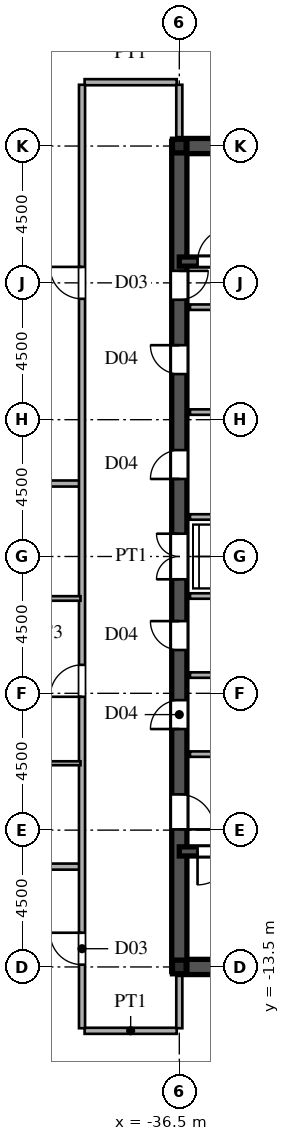
"""IFC4 building model, lengths in metres.
Left out: names, types, materials, properties, quantities, classifications, styles, units other than length and angle.
Written with IfcOpenShell. Run it as: python <this file> out.ifc"""

import sys

from ifc_helpers import new_model, si_unit, direction, frame, frame_2d, origin, origin_2d, place, context, subcontext, project, spatial, rectangle, i_section, extrude, source, transform, mapped, element, fill, save


model = new_model("IFC4")
c1 = context("Model", 3, precision=1e-05, world=origin(), true_north=direction((0.0, 1.0)))
c2 = subcontext(c1, "Body", "Model", "MODEL_VIEW")
j1 = project(units=[si_unit("LENGTHUNIT", "METRE"), si_unit("PLANEANGLEUNIT", "RADIAN")], contexts=[c1])
p1 = place(None, origin())
s1 = spatial("IfcSite", under=j1, at=p1, CompositionType="ELEMENT")
p2 = place(p1, origin())
s2 = spatial("IfcBuilding", under=s1, at=p2, CompositionType="ELEMENT")
p3 = place(p2, frame((0.0, 0.0, 254.4)))
s3 = spatial("IfcBuildingStorey", under=s2, at=p3, CompositionType="ELEMENT", Elevation=254.4)
m1 = source(origin(), c2, "Body", "SweptSolid", [
    extrude(i_section(OverallWidth=0.45, OverallDepth=0.45, WebThickness=0.016, FlangeThickness=0.025, at=origin_2d()), origin(), (0.0, 0.0, 1.0), 3.75),
])
for number, where, z_axis, x_axis in (
    (1, (-36.5, -13.5, 0.0), (0.0, 0.0, 1.0), (1.0, 0.0, 0.0)),
    (2, (-36.5, 13.5, 0.0), (0.0, 0.0, 1.0), (1.0, 0.0, 0.0)),
):
    element("IfcColumn", number, at=place(p3, frame(where, z_axis=z_axis, x_axis=x_axis)), inside=s3, PredefinedType="COLUMN", context=c2, shape_type="MappedRepresentation", body=[
        mapped(m1, transform((0.0, 0.0, 0.0), scale=1.0)),
    ])
for number, where, z_axis, x_axis in (
    (3, (-36.5, -13.5, 0.0), (0.0, 0.0, 1.0), (1.0, 0.0, 0.0)),
    (4, (-36.5, 13.5, 0.0), (0.0, 0.0, 1.0), (1.0, 0.0, 0.0)),
):
    element("IfcWall", number, at=place(p3, frame(where, z_axis=z_axis, x_axis=x_axis)), inside=s3, PredefinedType="SHEAR", context=c2, shape_type="SweptSolid", body=[
        extrude(rectangle(XDim=9.0, YDim=0.5, at=frame_2d((4.5, 0.0))), origin(), (0.0, 0.0, 1.0), 3.53),
    ])
p4 = place(p3, frame((-36.5, -13.65, 0.0), z_axis=(0.0, 0.0, 1.0), x_axis=(0.0, 1.0, 0.0)))
e5 = element("IfcWall", 5, at=p4, inside=s3, PredefinedType="SHEAR", context=c2, shape_type="SweptSolid", body=[
    extrude(rectangle(XDim=7.15, YDim=0.5, at=frame_2d((3.575, 0.0))), origin(), (0.0, 0.0, 1.0), 3.53),
])
p5 = place(p4, frame((4.675, 0.0, 0.0)))
e6 = element("IfcOpeningElement", 6, at=p5, cuts=e5, PredefinedType="OPENING", context=c2, shape_type="SweptSolid", body=[
    extrude(rectangle(XDim=1.15, YDim=2.2, at=frame_2d((0.575, 1.1))), frame((0.0, 0.26, 0.0), z_axis=(0.0, -1.0, 0.0), x_axis=(1.0, 0.0, 0.0)), (0.0, 0.0, 1.0), 0.52),
])
p6 = place(p3, frame((-36.5, -1.3, 0.0), z_axis=(0.0, 0.0, 1.0), x_axis=(0.0, 1.0, 0.0)))
e7 = element("IfcWall", 7, at=p6, inside=s3, PredefinedType="SHEAR", context=c2, shape_type="SweptSolid", body=[
    extrude(rectangle(XDim=2.6, YDim=0.5, at=frame_2d((1.3, 0.0))), origin(), (0.0, 0.0, 1.0), 3.53),
])
p7 = place(p6, frame((0.55, 0.0, 0.0)))
e8 = element("IfcOpeningElement", 8, at=p7, cuts=e7, PredefinedType="OPENING", context=c2, shape_type="SweptSolid", body=[
    extrude(rectangle(XDim=1.5, YDim=2.3, at=frame_2d((0.75, 1.15))), frame((0.0, 0.26, 0.0), z_axis=(0.0, -1.0, 0.0), x_axis=(1.0, 0.0, 0.0)), (0.0, 0.0, 1.0), 0.52),
])
p8 = place(p3, frame((-36.5, 8.2, 0.0), z_axis=(0.0, 0.0, 1.0), x_axis=(0.0, 1.0, 0.0)))
e9 = element("IfcWall", 9, at=p8, inside=s3, PredefinedType="SHEAR", context=c2, shape_type="SweptSolid", body=[
    extrude(rectangle(XDim=5.45, YDim=0.5, at=frame_2d((2.725, 0.0))), origin(), (0.0, 0.0, 1.0), 3.53),
])
p9 = place(p8, frame((0.245, 0.0, 0.0)))
e10 = element("IfcOpeningElement", 10, at=p9, cuts=e9, PredefinedType="OPENING", context=c2, shape_type="SweptSolid", body=[
    extrude(rectangle(XDim=0.95, YDim=2.15, at=frame_2d((0.475, 1.075))), frame((0.0, 0.26, 0.0), z_axis=(0.0, -1.0, 0.0), x_axis=(1.0, 0.0, 0.0)), (0.0, 0.0, 1.0), 0.52),
])
p10 = place(p3, frame((-36.5, -6.5, 0.0), z_axis=(0.0, 0.0, 1.0), x_axis=(0.0, 1.0, 0.0)))
e11 = element("IfcWall", 11, at=p10, inside=s3, PredefinedType="SHEAR", context=c2, shape_type="SweptSolid", body=[
    extrude(rectangle(XDim=2.6, YDim=0.5, at=frame_2d((1.3, 0.0))), origin(), (0.0, 0.0, 1.0), 3.53),
])
p11 = place(p10, frame((0.825, 0.0, 0.0)))
e12 = element("IfcOpeningElement", 12, at=p11, cuts=e11, PredefinedType="OPENING", context=c2, shape_type="SweptSolid", body=[
    extrude(rectangle(XDim=0.95, YDim=2.15, at=frame_2d((0.475, 1.075))), frame((0.0, 0.26, 0.0), z_axis=(0.0, -1.0, 0.0), x_axis=(1.0, 0.0, 0.0)), (0.0, 0.0, 1.0), 0.52),
])
p12 = place(p3, frame((-36.5, -3.9, 0.0), z_axis=(0.0, 0.0, 1.0), x_axis=(0.0, 1.0, 0.0)))
e13 = element("IfcWall", 13, at=p12, inside=s3, PredefinedType="SHEAR", context=c2, shape_type="SweptSolid", body=[
    extrude(rectangle(XDim=2.6, YDim=0.5, at=frame_2d((1.3, 0.0))), origin(), (0.0, 0.0, 1.0), 3.53),
])
p13 = place(p12, frame((0.825, 0.0, 0.0)))
e14 = element("IfcOpeningElement", 14, at=p13, cuts=e13, PredefinedType="OPENING", context=c2, shape_type="SweptSolid", body=[
    extrude(rectangle(XDim=0.95, YDim=2.15, at=frame_2d((0.475, 1.075))), frame((0.0, 0.26, 0.0), z_axis=(0.0, -1.0, 0.0), x_axis=(1.0, 0.0, 0.0)), (0.0, 0.0, 1.0), 0.52),
])
p14 = place(p3, frame((-36.5, 1.3, 0.0), z_axis=(0.0, 0.0, 1.0), x_axis=(0.0, 1.0, 0.0)))
e15 = element("IfcWall", 15, at=p14, inside=s3, PredefinedType="SHEAR", context=c2, shape_type="SweptSolid", body=[
    extrude(rectangle(XDim=3.45, YDim=0.5, at=frame_2d((1.725, 0.0))), origin(), (0.0, 0.0, 1.0), 3.53),
])
p15 = place(p14, frame((1.25, 0.0, 0.0)))
e16 = element("IfcOpeningElement", 16, at=p15, cuts=e15, PredefinedType="OPENING", context=c2, shape_type="SweptSolid", body=[
    extrude(rectangle(XDim=0.95, YDim=2.15, at=frame_2d((0.475, 1.075))), frame((0.0, 0.26, 0.0), z_axis=(0.0, -1.0, 0.0), x_axis=(1.0, 0.0, 0.0)), (0.0, 0.0, 1.0), 0.52),
])
p16 = place(p3, frame((-36.5, 4.75, 0.0), z_axis=(0.0, 0.0, 1.0), x_axis=(0.0, 1.0, 0.0)))
e17 = element("IfcWall", 17, at=p16, inside=s3, PredefinedType="SHEAR", context=c2, shape_type="SweptSolid", body=[
    extrude(rectangle(XDim=3.45, YDim=0.5, at=frame_2d((1.725, 0.0))), origin(), (0.0, 0.0, 1.0), 3.53),
])
p17 = place(p16, frame((1.25, 0.0, 0.0)))
e18 = element("IfcOpeningElement", 18, at=p17, cuts=e17, PredefinedType="OPENING", context=c2, shape_type="SweptSolid", body=[
    extrude(rectangle(XDim=0.95, YDim=2.15, at=frame_2d((0.475, 1.075))), frame((0.0, 0.26, 0.0), z_axis=(0.0, -1.0, 0.0), x_axis=(1.0, 0.0, 0.0)), (0.0, 0.0, 1.0), 0.52),
])
p18 = place(p3, frame((-36.5, -9.7, 0.0), z_axis=(0.0, 0.0, 1.0), x_axis=(1.0, 0.0, 0.0)))
e19 = element("IfcWall", 19, at=p18, inside=s3, PredefinedType="SHEAR", context=c2, shape_type="SweptSolid", body=[
    extrude(rectangle(XDim=9.0, YDim=0.3, at=frame_2d((4.5, 0.0))), origin(), (0.0, 0.0, 1.0), 3.53),
])
p19 = place(p18, frame((0.6, 0.0, 0.0)))
e20 = element("IfcOpeningElement", 20, at=p19, cuts=e19, PredefinedType="OPENING", context=c2, shape_type="SweptSolid", body=[
    extrude(rectangle(XDim=1.1, YDim=2.2, at=frame_2d((0.55, 1.1))), frame((0.0, 0.16, 0.0), z_axis=(0.0, -1.0, 0.0), x_axis=(1.0, 0.0, 0.0)), (0.0, 0.0, 1.0), 0.32),
])
p20 = place(p3, frame((-36.5, 9.7, 0.0), z_axis=(0.0, 0.0, 1.0), x_axis=(1.0, 0.0, 0.0)))
e21 = element("IfcWall", 21, at=p20, inside=s3, PredefinedType="SHEAR", context=c2, shape_type="SweptSolid", body=[
    extrude(rectangle(XDim=9.0, YDim=0.3, at=frame_2d((4.5, 0.0))), origin(), (0.0, 0.0, 1.0), 3.53),
])
p21 = place(p20, frame((0.6, 0.0, 0.0)))
e22 = element("IfcOpeningElement", 22, at=p21, cuts=e21, PredefinedType="OPENING", context=c2, shape_type="SweptSolid", body=[
    extrude(rectangle(XDim=1.1, YDim=2.2, at=frame_2d((0.55, 1.1))), frame((0.0, 0.16, 0.0), z_axis=(0.0, -1.0, 0.0), x_axis=(1.0, 0.0, 0.0)), (0.0, 0.0, 1.0), 0.32),
])
for number, where, z_axis, x_axis in (
    (23, (-36.15, -6.5, 0.0), (0.0, 0.0, 1.0), (1.0, 0.0, 0.0)),
    (24, (-36.15, 8.2, 0.0), (0.0, 0.0, 1.0), (1.0, 0.0, 0.0)),
):
    element("IfcWall", number, at=place(p3, frame(where, z_axis=z_axis, x_axis=x_axis)), inside=s3, PredefinedType="PARTITIONING", context=c2, shape_type="SweptSolid", body=[
        extrude(rectangle(XDim=5.7, YDim=0.18, at=frame_2d((2.85, 0.0))), origin(), (0.0, 0.0, 1.0), 3.53),
    ])
for number, where, z_axis, x_axis in (
    (25, (-36.15, -1.3, 0.0), (0.0, 0.0, 1.0), (1.0, 0.0, 0.0)),
    (26, (-36.15, 1.3, 0.0), (0.0, 0.0, 1.0), (1.0, 0.0, 0.0)),
    (27, (-36.15, -3.9, 0.0), (0.0, 0.0, 1.0), (1.0, 0.0, 0.0)),
    (28, (-36.15, 4.75, 0.0), (0.0, 0.0, 1.0), (1.0, 0.0, 0.0)),
):
    element("IfcWall", number, at=place(p3, frame(where, z_axis=z_axis, x_axis=x_axis)), inside=s3, PredefinedType="PARTITIONING", context=c2, shape_type="SweptSolid", body=[
        extrude(rectangle(XDim=2.95, YDim=0.18, at=frame_2d((1.475, 0.0))), origin(), (0.0, 0.0, 1.0), 3.53),
    ])
p22 = place(p3, frame((-39.615, -15.6, 0.0), z_axis=(0.0, 0.0, 1.0), x_axis=(1.0, 0.0, 0.0)))
e29 = element("IfcWall", 29, at=p22, inside=s3, PredefinedType="PARTITIONING", context=c2, shape_type="SweptSolid", body=[
    extrude(rectangle(XDim=3.03, YDim=0.2, at=frame_2d((1.515, 0.0))), origin(), (0.0, 0.0, 1.0), 3.53),
])
p23 = place(p3, frame((-53.01, -10.2, 0.0), z_axis=(0.0, 0.0, 1.0), x_axis=(1.0, 0.0, 0.0)))
e30 = element("IfcWall", 30, at=p23, inside=s3, PredefinedType="PARTITIONING", context=c2, shape_type="SweptSolid", body=[
    extrude(rectangle(XDim=13.23, YDim=0.2, at=frame_2d((6.615, 0.0))), origin(), (0.0, 0.0, 1.0), 3.53),
])
p24 = place(p3, frame((-44.25, -6.8, 0.0), z_axis=(0.0, 0.0, 1.0), x_axis=(1.0, 0.0, 0.0)))
e31 = element("IfcWall", 31, at=p24, inside=s3, PredefinedType="PARTITIONING", context=c2, shape_type="SweptSolid", body=[
    extrude(rectangle(XDim=4.5, YDim=0.13, at=frame_2d((2.25, 0.0))), origin(), (0.0, 0.0, 1.0), 3.53),
])
p25 = place(p24, frame((1.81, 0.0, 0.0)))
e32 = element("IfcOpeningElement", 32, at=p25, cuts=e31, PredefinedType="OPENING", context=c2, shape_type="SweptSolid", body=[
    extrude(rectangle(XDim=0.88, YDim=2.1, at=frame_2d((0.44, 1.05))), frame((0.0, 0.075, 0.0), z_axis=(0.0, -1.0, 0.0), x_axis=(1.0, 0.0, 0.0)), (0.0, 0.0, 1.0), 0.15),
])
p26 = place(p3, frame((-44.25, -1.38, 0.0), z_axis=(0.0, 0.0, 1.0), x_axis=(1.0, 0.0, 0.0)))
e33 = element("IfcWall", 33, at=p26, inside=s3, PredefinedType="PARTITIONING", context=c2, shape_type="SweptSolid", body=[
    extrude(rectangle(XDim=4.5, YDim=0.15, at=frame_2d((2.25, 0.0))), origin(), (0.0, 0.0, 1.0), 3.53),
])
p27 = place(p26, frame((1.775, 0.0, 0.0)))
e34 = element("IfcOpeningElement", 34, at=p27, cuts=e33, PredefinedType="OPENING", context=c2, shape_type="SweptSolid", body=[
    extrude(rectangle(XDim=0.95, YDim=2.15, at=frame_2d((0.475, 1.075))), frame((0.0, 0.085, 0.0), z_axis=(0.0, -1.0, 0.0), x_axis=(1.0, 0.0, 0.0)), (0.0, 0.0, 1.0), 0.17),
])
p28 = place(p3, frame((-66.01, 2.4, 0.0), z_axis=(0.0, 0.0, 1.0), x_axis=(1.0, 0.0, 0.0)))
e35 = element("IfcWall", 35, at=p28, inside=s3, PredefinedType="PARTITIONING", context=c2, shape_type="SweptSolid", body=[
    extrude(rectangle(XDim=26.23, YDim=0.2, at=frame_2d((13.115, 0.0))), origin(), (0.0, 0.0, 1.0), 3.53),
])
p29 = place(p3, frame((-39.615, 15.6, 0.0), z_axis=(0.0, 0.0, 1.0), x_axis=(1.0, 0.0, 0.0)))
e36 = element("IfcWall", 36, at=p29, inside=s3, PredefinedType="PARTITIONING", context=c2, shape_type="SweptSolid", body=[
    extrude(rectangle(XDim=3.03, YDim=0.2, at=frame_2d((1.515, 0.0))), origin(), (0.0, 0.0, 1.0), 3.53),
])
p30 = place(p3, frame((-39.7, -15.515, 0.0), z_axis=(0.0, 0.0, 1.0), x_axis=(0.0, 1.0, 0.0)))
e37 = element("IfcWall", 37, at=p30, inside=s3, PredefinedType="PARTITIONING", context=c2, shape_type="SweptSolid", body=[
    extrude(rectangle(XDim=31.03, YDim=0.2, at=frame_2d((15.515, 0.0))), origin(), (0.0, 0.0, 1.0), 3.53),
])
p31 = place(p30, frame((2.09, 0.0, 0.0)))
e38 = element("IfcOpeningElement", 38, at=p31, cuts=e37, PredefinedType="OPENING", context=c2, shape_type="SweptSolid", body=[
    extrude(rectangle(XDim=1.05, YDim=2.25, at=frame_2d((0.525, 1.125))), frame((0.0, 0.11, 0.0), z_axis=(0.0, -1.0, 0.0), x_axis=(1.0, 0.0, 0.0)), (0.0, 0.0, 1.0), 0.22),
])
p32 = place(p30, frame((10.901, 0.0, 0.0)))
e39 = element("IfcOpeningElement", 39, at=p32, cuts=e37, PredefinedType="OPENING", context=c2, shape_type="SweptSolid", body=[
    extrude(rectangle(XDim=1.05, YDim=2.25, at=frame_2d((0.525, 1.125))), frame((0.0, 0.11, 0.0), z_axis=(0.0, -1.0, 0.0), x_axis=(1.0, 0.0, 0.0)), (0.0, 0.0, 1.0), 0.22),
])
p33 = place(p30, frame((23.99, 0.0, 0.0)))
e40 = element("IfcOpeningElement", 40, at=p33, cuts=e37, PredefinedType="OPENING", context=c2, shape_type="SweptSolid", body=[
    extrude(rectangle(XDim=1.05, YDim=2.25, at=frame_2d((0.525, 1.125))), frame((0.0, 0.11, 0.0), z_axis=(0.0, -1.0, 0.0), x_axis=(1.0, 0.0, 0.0)), (0.0, 0.0, 1.0), 0.22),
])
for number, where, z_axis, x_axis in (
    (41, (-36.5, -15.515, 0.0), (0.0, 0.0, 1.0), (0.0, 1.0, 0.0)),
    (42, (-36.5, 13.755, 0.0), (0.0, 0.0, 1.0), (0.0, 1.0, 0.0)),
):
    element("IfcWall", number, at=place(p3, frame(where, z_axis=z_axis, x_axis=x_axis)), inside=s3, PredefinedType="PARTITIONING", context=c2, shape_type="SweptSolid", body=[
        extrude(rectangle(XDim=1.76, YDim=0.2, at=frame_2d((0.88, 0.0))), origin(), (0.0, 0.0, 1.0), 2.93),
    ])
m2 = source(origin(), c2, "Body", "SweptSolid", [
    extrude(rectangle(XDim=1.15, YDim=2.2, at=frame_2d((0.575, 1.1))), frame((0.0, 0.025, 0.0), z_axis=(0.0, -1.0, 0.0), x_axis=(1.0, 0.0, 0.0)), (0.0, 0.0, 1.0), 0.05),
])
p34 = place(p5, frame((1.15, 0.0, 0.0), z_axis=(0.0, 0.0, 1.0), x_axis=(-1.0, 0.0, 0.0)))
e43 = element("IfcDoor", 43, at=p34, inside=s3, OperationType="SINGLE_SWING_LEFT", PredefinedType="DOOR", context=c2, shape_type="MappedRepresentation", body=[
    mapped(m2, transform((0.0, 0.0, 0.0), scale=1.0)),
])
fill(e6, e43)
m3 = source(origin(), c2, "Body", "SweptSolid", [
    extrude(rectangle(XDim=1.5, YDim=2.3, at=frame_2d((0.75, 1.15))), frame((0.0, 0.025, 0.0), z_axis=(0.0, -1.0, 0.0), x_axis=(1.0, 0.0, 0.0)), (0.0, 0.0, 1.0), 0.05),
])
p35 = place(p7, origin())
e44 = element("IfcDoor", 44, at=p35, inside=s3, OperationType="DOUBLE_SWING_LEFT", PredefinedType="DOOR", context=c2, shape_type="MappedRepresentation", body=[
    mapped(m3, transform((0.0, 0.0, 0.0), scale=1.0)),
])
fill(e8, e44)
m4 = source(origin(), c2, "Body", "SweptSolid", [
    extrude(rectangle(XDim=0.95, YDim=2.15, at=frame_2d((0.475, 1.075))), frame((0.0, 0.025, 0.0), z_axis=(0.0, -1.0, 0.0), x_axis=(1.0, 0.0, 0.0)), (0.0, 0.0, 1.0), 0.05),
])
p36 = place(p9, frame((0.95, 0.0, 0.0), z_axis=(0.0, 0.0, 1.0), x_axis=(-1.0, 0.0, 0.0)))
e45 = element("IfcDoor", 45, at=p36, inside=s3, OperationType="SINGLE_SWING_RIGHT", PredefinedType="DOOR", context=c2, shape_type="MappedRepresentation", body=[
    mapped(m4, transform((0.0, 0.0, 0.0), scale=1.0)),
])
fill(e10, e45)
p37 = place(p11, origin())
e46 = element("IfcDoor", 46, at=p37, inside=s3, OperationType="SINGLE_SWING_LEFT", PredefinedType="DOOR", context=c2, shape_type="MappedRepresentation", body=[
    mapped(m4, transform((0.0, 0.0, 0.0), scale=1.0)),
])
fill(e12, e46)
p38 = place(p13, origin())
e47 = element("IfcDoor", 47, at=p38, inside=s3, OperationType="SINGLE_SWING_RIGHT", PredefinedType="DOOR", context=c2, shape_type="MappedRepresentation", body=[
    mapped(m4, transform((0.0, 0.0, 0.0), scale=1.0)),
])
fill(e14, e47)
p39 = place(p15, origin())
e48 = element("IfcDoor", 48, at=p39, inside=s3, OperationType="SINGLE_SWING_LEFT", PredefinedType="DOOR", context=c2, shape_type="MappedRepresentation", body=[
    mapped(m4, transform((0.0, 0.0, 0.0), scale=1.0)),
])
fill(e16, e48)
p40 = place(p17, origin())
e49 = element("IfcDoor", 49, at=p40, inside=s3, OperationType="SINGLE_SWING_RIGHT", PredefinedType="DOOR", context=c2, shape_type="MappedRepresentation", body=[
    mapped(m4, transform((0.0, 0.0, 0.0), scale=1.0)),
])
fill(e18, e49)
m5 = source(origin(), c2, "Body", "SweptSolid", [
    extrude(rectangle(XDim=1.1, YDim=2.2, at=frame_2d((0.55, 1.1))), frame((0.0, 0.025, 0.0), z_axis=(0.0, -1.0, 0.0), x_axis=(1.0, 0.0, 0.0)), (0.0, 0.0, 1.0), 0.05),
])
p41 = place(p19, frame((1.1, 0.0, 0.0), z_axis=(0.0, 0.0, 1.0), x_axis=(-1.0, 0.0, 0.0)))
e50 = element("IfcDoor", 50, at=p41, inside=s3, OperationType="SINGLE_SWING_LEFT", PredefinedType="DOOR", context=c2, shape_type="MappedRepresentation", body=[
    mapped(m5, transform((0.0, 0.0, 0.0), scale=1.0)),
])
fill(e20, e50)
p42 = place(p21, origin())
e51 = element("IfcDoor", 51, at=p42, inside=s3, OperationType="SINGLE_SWING_RIGHT", PredefinedType="DOOR", context=c2, shape_type="MappedRepresentation", body=[
    mapped(m5, transform((0.0, 0.0, 0.0), scale=1.0)),
])
fill(e22, e51)
m6 = source(origin(), c2, "Body", "SweptSolid", [
    extrude(rectangle(XDim=1.05, YDim=2.25, at=frame_2d((0.525, 1.125))), frame((0.0, 0.025, 0.0), z_axis=(0.0, -1.0, 0.0), x_axis=(1.0, 0.0, 0.0)), (0.0, 0.0, 1.0), 0.05),
])
p43 = place(p31, origin())
e52 = element("IfcDoor", 52, at=p43, inside=s3, OperationType="SINGLE_SWING_RIGHT", PredefinedType="DOOR", context=c2, shape_type="MappedRepresentation", body=[
    mapped(m6, transform((0.0, 0.0, 0.0), scale=1.0)),
])
fill(e38, e52)
p44 = place(p32, origin())
e53 = element("IfcDoor", 53, at=p44, inside=s3, OperationType="SINGLE_SWING_LEFT", PredefinedType="DOOR", context=c2, shape_type="MappedRepresentation", body=[
    mapped(m6, transform((0.0, 0.0, 0.0), scale=1.0)),
])
fill(e39, e53)
p45 = place(p33, origin())
e54 = element("IfcDoor", 54, at=p45, inside=s3, OperationType="SINGLE_SWING_RIGHT", PredefinedType="DOOR", context=c2, shape_type="MappedRepresentation", body=[
    mapped(m6, transform((0.0, 0.0, 0.0), scale=1.0)),
])
fill(e40, e54)
save(model, sys.argv[1])
